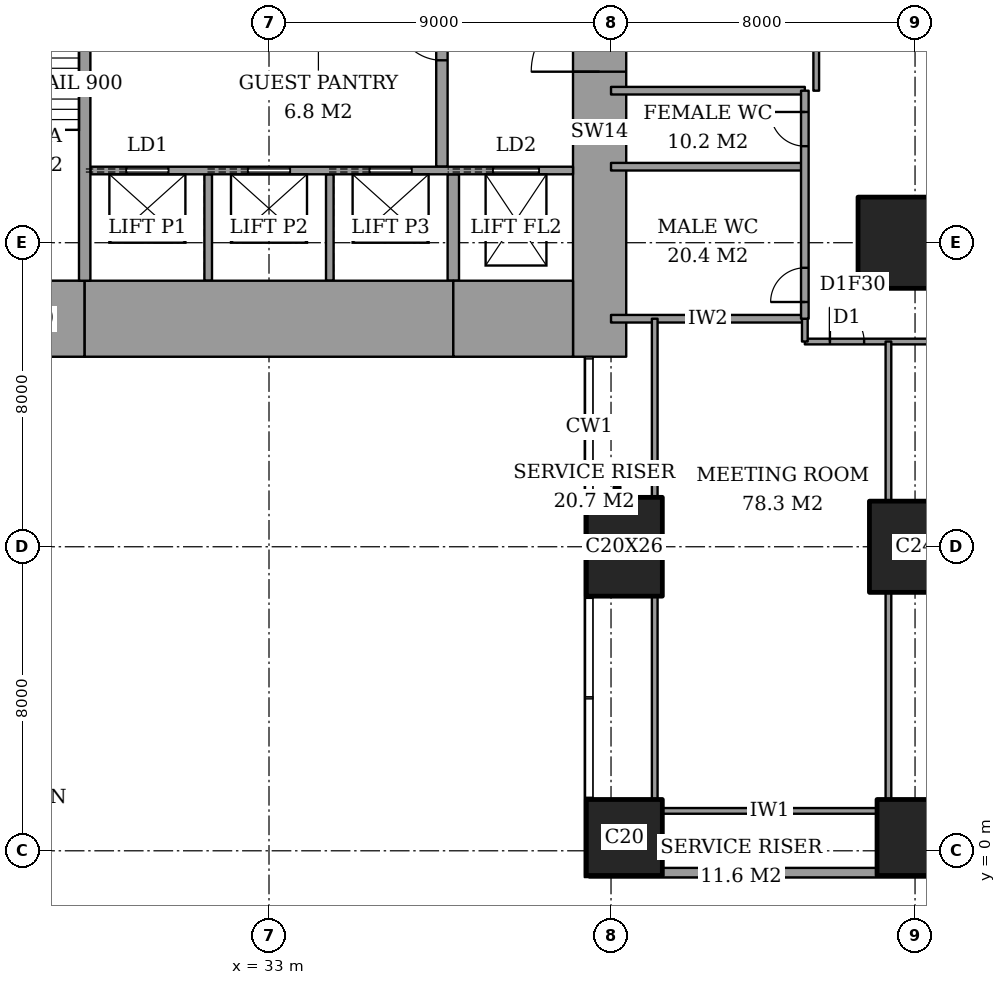
"""IFC4 building model, lengths in metres.
Left out: names, types, materials, properties, quantities, classifications, styles, units other than length and angle.
Written with IfcOpenShell. Run it as: python <this file> out.ifc"""

import sys

from ifc_helpers import new_model, si_unit, direction, frame, frame_2d, origin, origin_2d, place, context, subcontext, project, spatial, rectangle, extrude, element, fill, save


model = new_model("IFC4")
c1 = context("Model", 3, precision=1e-05, world=origin(), true_north=direction((0.0, 1.0)))
c2 = subcontext(c1, "Body", "Model", "MODEL_VIEW")
j1 = project(units=[si_unit("LENGTHUNIT", "METRE"), si_unit("PLANEANGLEUNIT", "RADIAN")], contexts=[c1])
p1 = place(None, origin())
s1 = spatial("IfcSite", under=j1, at=p1, CompositionType="ELEMENT")
p2 = place(p1, origin())
s2 = spatial("IfcBuilding", under=s1, at=p2, CompositionType="ELEMENT")
p3 = place(p2, frame((0.0, 0.0, 132.2)))
s3 = spatial("IfcBuildingStorey", under=s2, at=p3, CompositionType="ELEMENT", Elevation=132.2)
p4 = place(p3, frame((42.35, 0.35, 0.0), z_axis=(0.0, 0.0, 1.0), x_axis=(1.0, 0.0, 0.0)))
e1 = element("IfcColumn", 1, at=p4, inside=s3, PredefinedType="COLUMN", context=c2, shape_type="SweptSolid", body=[
    extrude(rectangle(XDim=2.0, YDim=2.0, at=origin_2d()), origin(), (0.0, 0.0, 1.0), 3.6),
])
p5 = place(p3, frame((42.35, 8.0, 0.0), z_axis=(0.0, 0.0, 1.0), x_axis=(1.0, 0.0, 0.0)))
e2 = element("IfcColumn", 2, at=p5, inside=s3, PredefinedType="COLUMN", context=c2, shape_type="SweptSolid", body=[
    extrude(rectangle(XDim=2.0, YDim=2.6, at=origin_2d()), origin(), (0.0, 0.0, 1.0), 3.6),
])
p6 = place(p3, frame((50.0, 0.35, 0.0), z_axis=(0.0, 0.0, 1.0), x_axis=(1.0, 0.0, 0.0)))
e3 = element("IfcColumn", 3, at=p6, inside=s3, PredefinedType="COLUMN", context=c2, shape_type="SweptSolid", body=[
    extrude(rectangle(XDim=2.0, YDim=2.0, at=origin_2d()), origin(), (0.0, 0.0, 1.0), 3.6),
])
p7 = place(p3, frame((50.0, 8.0, 0.0), z_axis=(0.0, 0.0, 1.0), x_axis=(1.0, 0.0, 0.0)))
e4 = element("IfcColumn", 4, at=p7, inside=s3, PredefinedType="COLUMN", context=c2, shape_type="SweptSolid", body=[
    extrude(rectangle(XDim=2.4, YDim=2.4, at=origin_2d()), origin(), (0.0, 0.0, 1.0), 3.6),
])
p8 = place(p3, frame((50.0, 16.0, 0.0), z_axis=(0.0, 0.0, 1.0), x_axis=(1.0, 0.0, 0.0)))
e5 = element("IfcColumn", 5, at=p8, inside=s3, PredefinedType="COLUMN", context=c2, shape_type="SweptSolid", body=[
    extrude(rectangle(XDim=3.0, YDim=2.4, at=origin_2d()), origin(), (0.0, 0.0, 1.0), 3.6),
])
p9 = place(p3, frame((25.0, 14.0, 0.0), z_axis=(0.0, 0.0, 1.0), x_axis=(1.0, 0.0, 0.0)))
e6 = element("IfcWall", 6, at=p9, inside=s3, PredefinedType="SHEAR", context=c2, shape_type="SweptSolid", body=[
    extrude(rectangle(XDim=3.15, YDim=2.0, at=frame_2d((1.575, 0.0))), origin(), (0.0, 0.0, 1.0), 3.6),
])
p10 = place(p3, frame((28.15, 14.0, 0.0), z_axis=(0.0, 0.0, 1.0), x_axis=(1.0, 0.0, 0.0)))
e7 = element("IfcWall", 7, at=p10, inside=s3, PredefinedType="SHEAR", context=c2, shape_type="SweptSolid", body=[
    extrude(rectangle(XDim=9.7, YDim=2.0, at=frame_2d((4.85, 0.0))), origin(), (0.0, 0.0, 1.0), 3.6),
])
p11 = place(p3, frame((37.85, 14.0, 0.0), z_axis=(0.0, 0.0, 1.0), x_axis=(1.0, 0.0, 0.0)))
e8 = element("IfcWall", 8, at=p11, inside=s3, PredefinedType="SHEAR", context=c2, shape_type="SweptSolid", body=[
    extrude(rectangle(XDim=3.15, YDim=2.0, at=frame_2d((1.575, 0.0))), origin(), (0.0, 0.0, 1.0), 3.6),
])
p12 = place(p3, frame((41.7, 13.0, 0.0), z_axis=(0.0, 0.0, 1.0), x_axis=(0.0, 1.0, 0.0)))
e9 = element("IfcWall", 9, at=p12, inside=s3, PredefinedType="SHEAR", context=c2, shape_type="SweptSolid", body=[
    extrude(rectangle(XDim=11.85, YDim=1.4, at=frame_2d((5.925, 0.0))), origin(), (0.0, 0.0, 1.0), 3.6),
])
p13 = place(p12, frame((7.5, 0.0, 0.0)))
e10 = element("IfcOpeningElement", 10, at=p13, cuts=e9, PredefinedType="OPENING", context=c2, shape_type="SweptSolid", body=[
    extrude(rectangle(XDim=1.8, YDim=2.4, at=frame_2d((0.9, 1.2))), frame((0.0, 0.71, 0.0), z_axis=(0.0, -1.0, 0.0), x_axis=(1.0, 0.0, 0.0)), (0.0, 0.0, 1.0), 1.42),
])
p14 = place(p3, frame((28.15, 15.0, 0.0), z_axis=(0.0, 0.0, 1.0), x_axis=(0.0, 1.0, 0.0)))
e11 = element("IfcWall", 11, at=p14, inside=s3, PredefinedType="SHEAR", context=c2, shape_type="SweptSolid", body=[
    extrude(rectangle(XDim=8.15, YDim=0.3, at=frame_2d((4.075, 0.0))), origin(), (0.0, 0.0, 1.0), 3.6),
])
p15 = place(p3, frame((37.55, 18.0, 0.0), z_axis=(0.0, 0.0, 1.0), x_axis=(0.0, 1.0, 0.0)))
e12 = element("IfcWall", 12, at=p15, inside=s3, PredefinedType="PARTITIONING", context=c2, shape_type="SweptSolid", body=[
    extrude(rectangle(XDim=6.7, YDim=0.3, at=frame_2d((3.35, 0.0))), origin(), (0.0, 0.0, 1.0), 3.6),
])
p16 = place(p15, frame((2.8, 0.0, 0.0)))
e13 = element("IfcOpeningElement", 13, at=p16, cuts=e12, PredefinedType="OPENING", context=c2, shape_type="SweptSolid", body=[
    extrude(rectangle(XDim=1.2, YDim=2.1, at=frame_2d((0.6, 1.05))), frame((0.0, 0.16, 0.0), z_axis=(0.0, -1.0, 0.0), x_axis=(1.0, 0.0, 0.0)), (0.0, 0.0, 1.0), 0.32),
])
p17 = place(p3, frame((41.425, -0.575, 0.0), z_axis=(0.0, 0.0, 1.0), x_axis=(1.0, 0.0, 0.0)))
e14 = element("IfcWall", 14, at=p17, inside=s3, PredefinedType="SOLIDWALL", context=c2, shape_type="SweptSolid", body=[
    extrude(rectangle(XDim=21.4, YDim=0.25, at=frame_2d((10.7, 0.0))), origin(), (0.0, 0.0, 1.0), 3.6),
])
p18 = place(p17, frame((19.575, 0.0, 0.4)))
e15 = element("IfcOpeningElement", 15, at=p18, cuts=e14, PredefinedType="OPENING", context=c2, shape_type="SweptSolid", body=[
    extrude(rectangle(XDim=1.2, YDim=2.2, at=frame_2d((0.6, 1.1))), frame((0.0, 0.135, 0.0), z_axis=(0.0, -1.0, 0.0), x_axis=(1.0, 0.0, 0.0)), (0.0, 0.0, 1.0), 0.27),
])
p19 = place(p3, frame((43.35, 1.05, 0.0), z_axis=(0.0, 0.0, 1.0), x_axis=(1.0, 0.0, 0.0)))
e16 = element("IfcWall", 16, at=p19, inside=s3, PredefinedType="PARTITIONING", context=c2, shape_type="SweptSolid", body=[
    extrude(rectangle(XDim=5.65, YDim=0.15, at=frame_2d((2.825, 0.0))), origin(), (0.0, 0.0, 1.0), 3.35),
])
p20 = place(p3, frame((47.1, 13.4, 0.0), z_axis=(0.0, 0.0, 1.0), x_axis=(1.0, 0.0, 0.0)))
e17 = element("IfcWall", 17, at=p20, inside=s3, PredefinedType="PARTITIONING", context=c2, shape_type="SweptSolid", body=[
    extrude(rectangle(XDim=5.4, YDim=0.15, at=frame_2d((2.7, 0.0))), origin(), (0.0, 0.0, 1.0), 3.35),
])
p21 = place(p20, frame((0.66, 0.0, 0.0)))
e18 = element("IfcOpeningElement", 18, at=p21, cuts=e17, PredefinedType="OPENING", context=c2, shape_type="SweptSolid", body=[
    extrude(rectangle(XDim=0.9, YDim=2.1, at=frame_2d((0.45, 1.05))), frame((0.0, 0.085, 0.0), z_axis=(0.0, -1.0, 0.0), x_axis=(1.0, 0.0, 0.0)), (0.0, 0.0, 1.0), 0.17),
])
for number, where, z_axis, x_axis in (
    (19, (42.0, 14.0, 0.0), (0.0, 0.0, 1.0), (1.0, 0.0, 0.0)),
    (20, (42.0, 18.0, 0.0), (0.0, 0.0, 1.0), (1.0, 0.0, 0.0)),
    (21, (42.0, 20.0, 0.0), (0.0, 0.0, 1.0), (1.0, 0.0, 0.0)),
):
    element("IfcWall", number, at=place(p3, frame(where, z_axis=z_axis, x_axis=x_axis)), inside=s3, PredefinedType="PARTITIONING", context=c2, shape_type="SweptSolid", body=[
        extrude(rectangle(XDim=5.1, YDim=0.2, at=frame_2d((2.55, 0.0))), origin(), (0.0, 0.0, 1.0), 3.35),
    ])
p22 = place(p3, frame((43.15, 1.35, 0.0), z_axis=(0.0, 0.0, 1.0), x_axis=(0.0, 1.0, 0.0)))
e22 = element("IfcWall", 22, at=p22, inside=s3, PredefinedType="PARTITIONING", context=c2, shape_type="SweptSolid", body=[
    extrude(rectangle(XDim=5.35, YDim=0.15, at=frame_2d((2.675, 0.0))), origin(), (0.0, 0.0, 1.0), 3.35),
])
p23 = place(p3, frame((43.15, 9.3, 0.0), z_axis=(0.0, 0.0, 1.0), x_axis=(0.0, 1.0, 0.0)))
e23 = element("IfcWall", 23, at=p23, inside=s3, PredefinedType="PARTITIONING", context=c2, shape_type="SweptSolid", body=[
    extrude(rectangle(XDim=4.7, YDim=0.15, at=frame_2d((2.35, 0.0))), origin(), (0.0, 0.0, 1.0), 3.35),
])
p24 = place(p3, frame((47.1, 14.0, 0.0), z_axis=(0.0, 0.0, 1.0), x_axis=(0.0, 1.0, 0.0)))
e24 = element("IfcWall", 24, at=p24, inside=s3, PredefinedType="PARTITIONING", context=c2, shape_type="SweptSolid", body=[
    extrude(rectangle(XDim=6.0, YDim=0.2, at=frame_2d((3.0, 0.0))), origin(), (0.0, 0.0, 1.0), 3.35),
])
p25 = place(p24, frame((0.44, 0.0, 0.0)))
e25 = element("IfcOpeningElement", 25, at=p25, cuts=e24, PredefinedType="OPENING", context=c2, shape_type="SweptSolid", body=[
    extrude(rectangle(XDim=0.9, YDim=2.1, at=frame_2d((0.45, 1.05))), frame((0.0, 0.11, 0.0), z_axis=(0.0, -1.0, 0.0), x_axis=(1.0, 0.0, 0.0)), (0.0, 0.0, 1.0), 0.22),
])
p26 = place(p24, frame((4.54, 0.0, 0.0)))
e26 = element("IfcOpeningElement", 26, at=p26, cuts=e24, PredefinedType="OPENING", context=c2, shape_type="SweptSolid", body=[
    extrude(rectangle(XDim=0.9, YDim=2.1, at=frame_2d((0.45, 1.05))), frame((0.0, 0.11, 0.0), z_axis=(0.0, -1.0, 0.0), x_axis=(1.0, 0.0, 0.0)), (0.0, 0.0, 1.0), 0.22),
])
p27 = place(p3, frame((47.1, 13.4, 0.0), z_axis=(0.0, 0.0, 1.0), x_axis=(0.0, 1.0, 0.0)))
e27 = element("IfcWall", 27, at=p27, inside=s3, PredefinedType="PARTITIONING", context=c2, shape_type="SweptSolid", body=[
    extrude(rectangle(XDim=0.6, YDim=0.15, at=frame_2d((0.3, 0.0))), origin(), (0.0, 0.0, 1.0), 3.35),
])
p28 = place(p3, frame((47.4, 20.0, 0.0), z_axis=(0.0, 0.0, 1.0), x_axis=(0.0, 1.0, 0.0)))
e28 = element("IfcWall", 28, at=p28, inside=s3, PredefinedType="PARTITIONING", context=c2, shape_type="SweptSolid", body=[
    extrude(rectangle(XDim=8.0, YDim=0.15, at=frame_2d((4.0, 0.0))), origin(), (0.0, 0.0, 1.0), 3.35),
])
p29 = place(p28, frame((3.5, 0.0, 0.0)))
e29 = element("IfcOpeningElement", 29, at=p29, cuts=e28, PredefinedType="OPENING", context=c2, shape_type="SweptSolid", body=[
    extrude(rectangle(XDim=1.0, YDim=2.1, at=frame_2d((0.5, 1.05))), frame((0.0, 0.085, 0.0), z_axis=(0.0, -1.0, 0.0), x_axis=(1.0, 0.0, 0.0)), (0.0, 0.0, 1.0), 0.17),
])
p30 = place(p3, frame((49.3, 1.35, 0.0), z_axis=(0.0, 0.0, 1.0), x_axis=(0.0, 1.0, 0.0)))
e30 = element("IfcWall", 30, at=p30, inside=s3, PredefinedType="PARTITIONING", context=c2, shape_type="SweptSolid", body=[
    extrude(rectangle(XDim=5.45, YDim=0.15, at=frame_2d((2.725, 0.0))), origin(), (0.0, 0.0, 1.0), 3.35),
])
p31 = place(p3, frame((49.3, 9.2, 0.0), z_axis=(0.0, 0.0, 1.0), x_axis=(0.0, 1.0, 0.0)))
e31 = element("IfcWall", 31, at=p31, inside=s3, PredefinedType="PARTITIONING", context=c2, shape_type="SweptSolid", body=[
    extrude(rectangle(XDim=4.2, YDim=0.15, at=frame_2d((2.1, 0.0))), origin(), (0.0, 0.0, 1.0), 3.35),
])
p32 = place(p3, frame((28.3, 17.9, 0.0), z_axis=(0.0, 0.0, 1.0), x_axis=(1.0, 0.0, 0.0)))
e32 = element("IfcWall", 32, at=p32, inside=s3, PredefinedType="PARTITIONING", context=c2, shape_type="SweptSolid", body=[
    extrude(rectangle(XDim=12.7, YDim=0.2, at=frame_2d((6.35, 0.0))), origin(), (0.0, 0.0, 1.0), 3.6),
])
p33 = place(p32, frame((0.95, 0.0, 0.0)))
e33 = element("IfcOpeningElement", 33, at=p33, cuts=e32, PredefinedType="OPENING", context=c2, shape_type="SweptSolid", body=[
    extrude(rectangle(XDim=1.1, YDim=2.1, at=frame_2d((0.55, 1.05))), frame((0.0, 0.11, 0.0), z_axis=(0.0, -1.0, 0.0), x_axis=(1.0, 0.0, 0.0)), (0.0, 0.0, 1.0), 0.22),
])
p34 = place(p32, frame((4.15, 0.0, 0.0)))
e34 = element("IfcOpeningElement", 34, at=p34, cuts=e32, PredefinedType="OPENING", context=c2, shape_type="SweptSolid", body=[
    extrude(rectangle(XDim=1.1, YDim=2.1, at=frame_2d((0.55, 1.05))), frame((0.0, 0.11, 0.0), z_axis=(0.0, -1.0, 0.0), x_axis=(1.0, 0.0, 0.0)), (0.0, 0.0, 1.0), 0.22),
])
p35 = place(p32, frame((7.35, 0.0, 0.0)))
e35 = element("IfcOpeningElement", 35, at=p35, cuts=e32, PredefinedType="OPENING", context=c2, shape_type="SweptSolid", body=[
    extrude(rectangle(XDim=1.1, YDim=2.1, at=frame_2d((0.55, 1.05))), frame((0.0, 0.11, 0.0), z_axis=(0.0, -1.0, 0.0), x_axis=(1.0, 0.0, 0.0)), (0.0, 0.0, 1.0), 0.22),
])
p36 = place(p32, frame((10.6, 0.0, 0.0)))
e36 = element("IfcOpeningElement", 36, at=p36, cuts=e32, PredefinedType="OPENING", context=c2, shape_type="SweptSolid", body=[
    extrude(rectangle(XDim=1.2, YDim=2.1, at=frame_2d((0.6, 1.05))), frame((0.0, 0.11, 0.0), z_axis=(0.0, -1.0, 0.0), x_axis=(1.0, 0.0, 0.0)), (0.0, 0.0, 1.0), 0.22),
])
for number, where, z_axis, x_axis in (
    (37, (31.4, 15.0, 0.0), (0.0, 0.0, 1.0), (0.0, 1.0, 0.0)),
    (38, (34.6, 15.0, 0.0), (0.0, 0.0, 1.0), (0.0, 1.0, 0.0)),
):
    element("IfcWall", number, at=place(p3, frame(where, z_axis=z_axis, x_axis=x_axis)), inside=s3, PredefinedType="PARTITIONING", context=c2, shape_type="SweptSolid", body=[
        extrude(rectangle(XDim=2.8, YDim=0.2, at=frame_2d((1.4, 0.0))), origin(), (0.0, 0.0, 1.0), 3.6),
    ])
p37 = place(p3, frame((37.85, 15.0, 0.0), z_axis=(0.0, 0.0, 1.0), x_axis=(0.0, 1.0, 0.0)))
e39 = element("IfcWall", 39, at=p37, inside=s3, PredefinedType="SHEAR", context=c2, shape_type="SweptSolid", body=[
    extrude(rectangle(XDim=2.8, YDim=0.3, at=frame_2d((1.4, 0.0))), origin(), (0.0, 0.0, 1.0), 3.6),
])
p38 = place(p25, origin())
e40 = element("IfcDoor", 40, at=p38, inside=s3, OperationType="SINGLE_SWING_RIGHT", PredefinedType="DOOR", context=c2, shape_type="SweptSolid", body=[
    extrude(rectangle(XDim=0.9, YDim=2.1, at=frame_2d((0.45, 1.05))), frame((0.0, 0.025, 0.0), z_axis=(0.0, -1.0, 0.0), x_axis=(1.0, 0.0, 0.0)), (0.0, 0.0, 1.0), 0.05),
])
fill(e25, e40)
p39 = place(p26, origin())
e41 = element("IfcDoor", 41, at=p39, inside=s3, OperationType="SINGLE_SWING_LEFT", PredefinedType="DOOR", context=c2, shape_type="SweptSolid", body=[
    extrude(rectangle(XDim=0.9, YDim=2.1, at=frame_2d((0.45, 1.05))), frame((0.0, 0.025, 0.0), z_axis=(0.0, -1.0, 0.0), x_axis=(1.0, 0.0, 0.0)), (0.0, 0.0, 1.0), 0.05),
])
fill(e26, e41)
p40 = place(p21, origin())
e42 = element("IfcDoor", 42, at=p40, inside=s3, OperationType="SINGLE_SWING_RIGHT", PredefinedType="DOOR", context=c2, shape_type="SweptSolid", body=[
    extrude(rectangle(XDim=0.9, YDim=2.1, at=frame_2d((0.45, 1.05))), frame((0.0, 0.025, 0.0), z_axis=(0.0, -1.0, 0.0), x_axis=(1.0, 0.0, 0.0)), (0.0, 0.0, 1.0), 0.05),
])
fill(e18, e42)
p41 = place(p16, origin())
e43 = element("IfcDoor", 43, at=p41, inside=s3, OperationType="SINGLE_SWING_LEFT", PredefinedType="DOOR", context=c2, shape_type="SweptSolid", body=[
    extrude(rectangle(XDim=1.2, YDim=2.1, at=frame_2d((0.6, 1.05))), frame((0.0, 0.025, 0.0), z_axis=(0.0, -1.0, 0.0), x_axis=(1.0, 0.0, 0.0)), (0.0, 0.0, 1.0), 0.05),
])
fill(e13, e43)
p42 = place(p13, origin())
e44 = element("IfcDoor", 44, at=p42, inside=s3, OperationType="DOUBLE_DOOR_DOUBLE_SWING", PredefinedType="DOOR", context=c2, shape_type="SweptSolid", body=[
    extrude(rectangle(XDim=1.8, YDim=2.4, at=frame_2d((0.9, 1.2))), frame((0.0, 0.025, 0.0), z_axis=(0.0, -1.0, 0.0), x_axis=(1.0, 0.0, 0.0)), (0.0, 0.0, 1.0), 0.05),
])
fill(e10, e44)
p43 = place(p33, origin())
e45 = element("IfcDoor", 45, at=p43, inside=s3, OperationType="SLIDING_TO_LEFT", PredefinedType="DOOR", context=c2, shape_type="SweptSolid", body=[
    extrude(rectangle(XDim=1.1, YDim=2.1, at=frame_2d((0.55, 1.05))), frame((0.0, 0.025, 0.0), z_axis=(0.0, -1.0, 0.0), x_axis=(1.0, 0.0, 0.0)), (0.0, 0.0, 1.0), 0.05),
])
fill(e33, e45)
p44 = place(p34, origin())
e46 = element("IfcDoor", 46, at=p44, inside=s3, OperationType="SLIDING_TO_LEFT", PredefinedType="DOOR", context=c2, shape_type="SweptSolid", body=[
    extrude(rectangle(XDim=1.1, YDim=2.1, at=frame_2d((0.55, 1.05))), frame((0.0, 0.025, 0.0), z_axis=(0.0, -1.0, 0.0), x_axis=(1.0, 0.0, 0.0)), (0.0, 0.0, 1.0), 0.05),
])
fill(e34, e46)
p45 = place(p35, origin())
e47 = element("IfcDoor", 47, at=p45, inside=s3, OperationType="SLIDING_TO_LEFT", PredefinedType="DOOR", context=c2, shape_type="SweptSolid", body=[
    extrude(rectangle(XDim=1.1, YDim=2.1, at=frame_2d((0.55, 1.05))), frame((0.0, 0.025, 0.0), z_axis=(0.0, -1.0, 0.0), x_axis=(1.0, 0.0, 0.0)), (0.0, 0.0, 1.0), 0.05),
])
fill(e35, e47)
p46 = place(p36, origin())
e48 = element("IfcDoor", 48, at=p46, inside=s3, OperationType="SLIDING_TO_LEFT", PredefinedType="DOOR", context=c2, shape_type="SweptSolid", body=[
    extrude(rectangle(XDim=1.2, YDim=2.1, at=frame_2d((0.6, 1.05))), frame((0.0, 0.025, 0.0), z_axis=(0.0, -1.0, 0.0), x_axis=(1.0, 0.0, 0.0)), (0.0, 0.0, 1.0), 0.05),
])
fill(e36, e48)
save(model, sys.argv[1])
